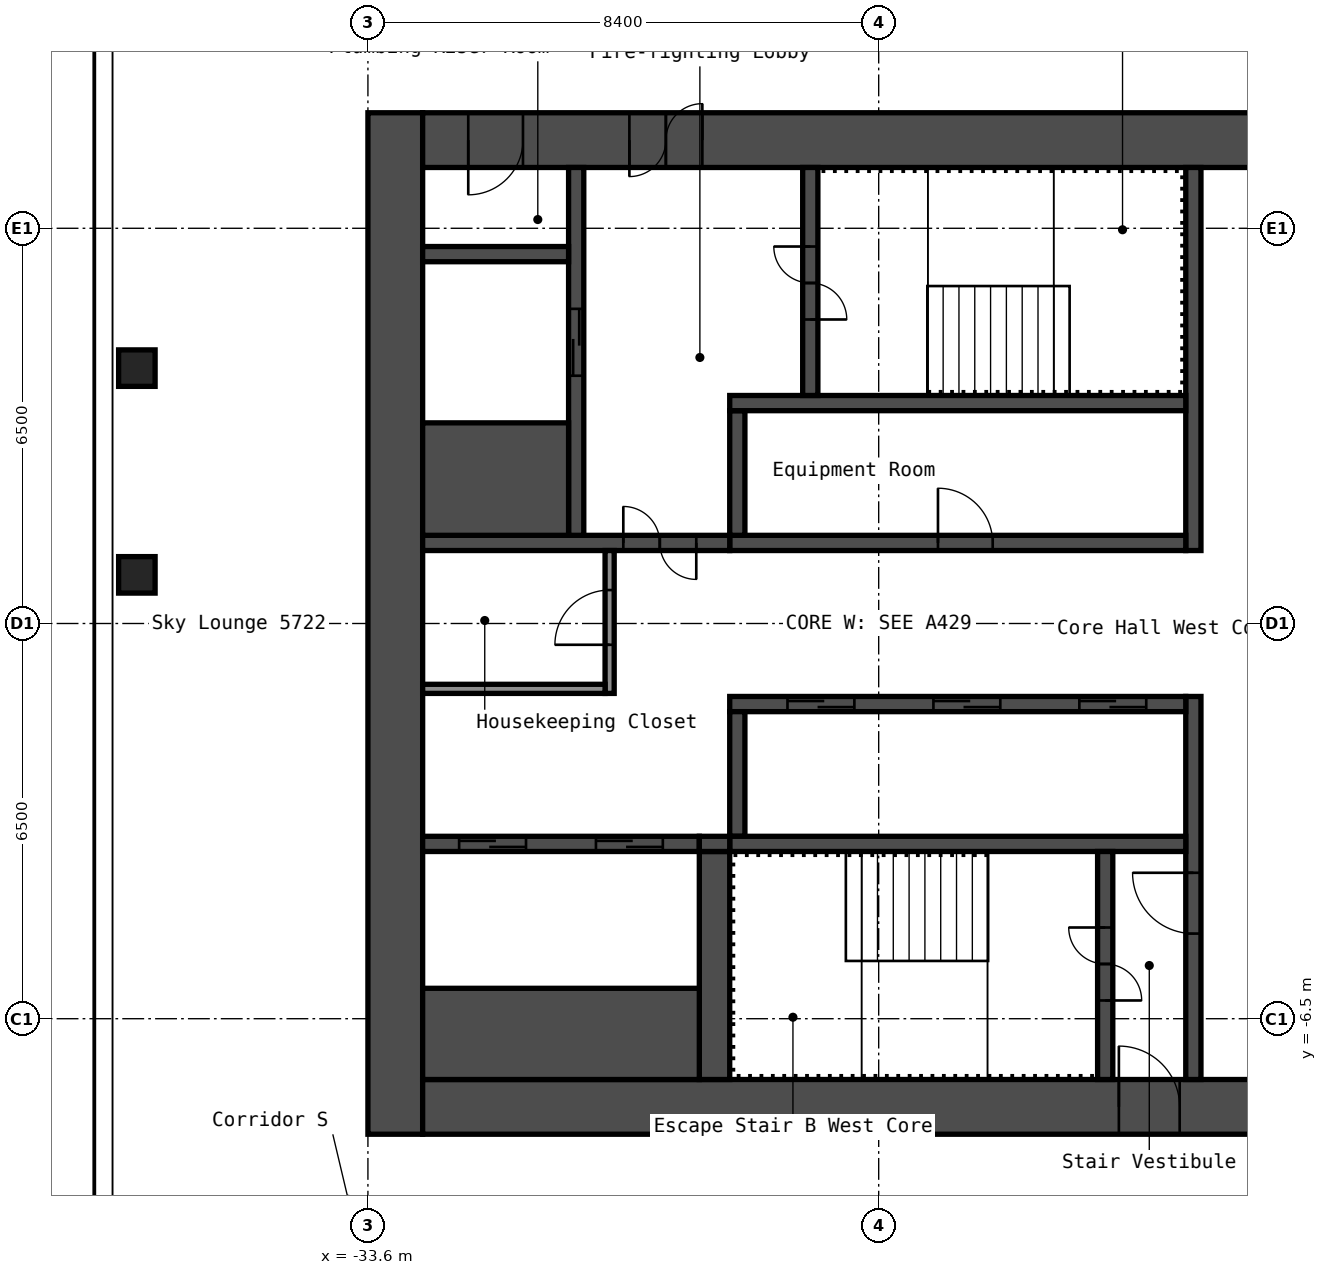
"""IFC4 building model, lengths in metres.
Left out: names, types, materials, properties, quantities, classifications, styles, units other than length and angle.
Written with IfcOpenShell. Run it as: python <this file> out.ifc"""

import sys

from ifc_helpers import new_model, si_unit, direction, frame, frame_2d, origin, origin_2d, place, context, subcontext, project, spatial, rectangle, hollow_rectangle, extrude, element, fill, save


model = new_model("IFC4")
c1 = context("Model", 3, precision=1e-05, world=origin(), true_north=direction((0.0, 1.0)))
c2 = subcontext(c1, "Body", "Model", "MODEL_VIEW")
j1 = project(units=[si_unit("LENGTHUNIT", "METRE"), si_unit("PLANEANGLEUNIT", "RADIAN")], contexts=[c1])
p1 = place(None, origin())
s1 = spatial("IfcSite", under=j1, at=p1, CompositionType="ELEMENT")
p2 = place(p1, origin())
s2 = spatial("IfcBuilding", under=s1, at=p2, CompositionType="ELEMENT")
p3 = place(p2, frame((0.0, 0.0, 202.6)))
s3 = spatial("IfcBuildingStorey", under=s2, at=p3, CompositionType="ELEMENT", Elevation=202.6)
for number, where, z_axis, x_axis in (
    (1, (-37.4, 0.8, 0.0), (0.0, 0.0, 1.0), (1.0, 0.0, 0.0)),
    (2, (-37.4, 4.2, 0.0), (0.0, 0.0, 1.0), (1.0, 0.0, 0.0)),
):
    element("IfcColumn", number, at=place(p3, frame(where, z_axis=z_axis, x_axis=x_axis)), inside=s3, PredefinedType="COLUMN", context=c2, shape_type="SweptSolid", body=[
        extrude(hollow_rectangle(XDim=0.6, YDim=0.6, WallThickness=0.025, InnerFilletRadius=0.038, OuterFilletRadius=0.062, at=origin_2d()), origin(), (0.0, 0.0, 1.0), 2.75),
    ])
p4 = place(p3, frame((-33.15, -8.4, 0.0), z_axis=(0.0, 0.0, 1.0), x_axis=(0.0, 1.0, 0.0)))
e3 = element("IfcWall", 3, at=p4, inside=s3, PredefinedType="SHEAR", context=c2, shape_type="SweptSolid", body=[
    extrude(rectangle(XDim=16.8, YDim=0.9, at=frame_2d((8.4, 0.0))), origin(), (0.0, 0.0, 1.0), 2.75),
])
p5 = place(p3, frame((-32.7, 7.95, 0.0), z_axis=(0.0, 0.0, 1.0), x_axis=(1.0, 0.0, 0.0)))
e4 = element("IfcWall", 4, at=p5, inside=s3, PredefinedType="SHEAR", context=c2, shape_type="SweptSolid", body=[
    extrude(rectangle(XDim=15.0, YDim=0.9, at=frame_2d((7.5, 0.0))), origin(), (0.0, 0.0, 1.0), 2.75),
])
p6 = place(p5, frame((3.4, 0.0, 0.0)))
e5 = element("IfcOpeningElement", 5, at=p6, cuts=e4, PredefinedType="OPENING", context=c2, shape_type="SweptSolid", body=[
    extrude(rectangle(XDim=1.2, YDim=2.1, at=frame_2d((0.6, 1.05))), frame((0.0, 0.46, 0.0), z_axis=(0.0, -1.0, 0.0), x_axis=(1.0, 0.0, 0.0)), (0.0, 0.0, 1.0), 0.92),
])
p7 = place(p5, frame((0.75, 0.0, 0.0)))
e6 = element("IfcOpeningElement", 6, at=p7, cuts=e4, PredefinedType="OPENING", context=c2, shape_type="SweptSolid", body=[
    extrude(rectangle(XDim=0.9, YDim=2.1, at=frame_2d((0.45, 1.05))), frame((0.0, 0.46, 0.0), z_axis=(0.0, -1.0, 0.0), x_axis=(1.0, 0.0, 0.0)), (0.0, 0.0, 1.0), 0.92),
])
p8 = place(p3, frame((-32.7, -7.95, 0.0), z_axis=(0.0, 0.0, 1.0), x_axis=(1.0, 0.0, 0.0)))
e7 = element("IfcWall", 7, at=p8, inside=s3, PredefinedType="SHEAR", context=c2, shape_type="SweptSolid", body=[
    extrude(rectangle(XDim=15.0, YDim=0.9, at=frame_2d((7.5, 0.0))), origin(), (0.0, 0.0, 1.0), 2.75),
])
p9 = place(p8, frame((11.45, 0.0, 0.0)))
e8 = element("IfcOpeningElement", 8, at=p9, cuts=e7, PredefinedType="OPENING", context=c2, shape_type="SweptSolid", body=[
    extrude(rectangle(XDim=1.0, YDim=2.1, at=frame_2d((0.5, 1.05))), frame((0.0, 0.46, 0.0), z_axis=(0.0, -1.0, 0.0), x_axis=(1.0, 0.0, 0.0)), (0.0, 0.0, 1.0), 0.92),
])
p10 = place(p3, frame((-20.025, 1.2, 0.0), z_axis=(0.0, 0.0, 1.0), x_axis=(0.0, 1.0, 0.0)))
e9 = element("IfcWall", 9, at=p10, inside=s3, PredefinedType="SHEAR", context=c2, shape_type="SweptSolid", body=[
    extrude(rectangle(XDim=6.3, YDim=0.25, at=frame_2d((3.15, 0.0))), origin(), (0.0, 0.0, 1.0), 2.75),
])
p11 = place(p3, frame((-20.025, -7.5, 0.0), z_axis=(0.0, 0.0, 1.0), x_axis=(0.0, 1.0, 0.0)))
e10 = element("IfcWall", 10, at=p11, inside=s3, PredefinedType="SHEAR", context=c2, shape_type="SweptSolid", body=[
    extrude(rectangle(XDim=6.3, YDim=0.25, at=frame_2d((3.15, 0.0))), origin(), (0.0, 0.0, 1.0), 2.75),
])
p12 = place(p11, frame((2.4, 0.0, 0.0)))
e11 = element("IfcOpeningElement", 11, at=p12, cuts=e10, PredefinedType="OPENING", context=c2, shape_type="SweptSolid", body=[
    extrude(rectangle(XDim=1.0, YDim=2.1, at=frame_2d((0.5, 1.05))), frame((0.0, 0.135, 0.0), z_axis=(0.0, -1.0, 0.0), x_axis=(1.0, 0.0, 0.0)), (0.0, 0.0, 1.0), 0.27),
])
p13 = place(p3, frame((-27.65, 1.325, 0.0), z_axis=(0.0, 0.0, 1.0), x_axis=(1.0, 0.0, 0.0)))
e12 = element("IfcWall", 12, at=p13, inside=s3, PredefinedType="SHEAR", context=c2, shape_type="SweptSolid", body=[
    extrude(rectangle(XDim=7.5, YDim=0.25, at=frame_2d((3.75, 0.0))), origin(), (0.0, 0.0, 1.0), 2.75),
])
p14 = place(p13, frame((3.425, 0.0, 0.0)))
e13 = element("IfcOpeningElement", 13, at=p14, cuts=e12, PredefinedType="OPENING", context=c2, shape_type="SweptSolid", body=[
    extrude(rectangle(XDim=0.9, YDim=2.1, at=frame_2d((0.45, 1.05))), frame((0.0, 0.135, 0.0), z_axis=(0.0, -1.0, 0.0), x_axis=(1.0, 0.0, 0.0)), (0.0, 0.0, 1.0), 0.27),
])
p15 = place(p3, frame((-27.525, 1.45, 0.0), z_axis=(0.0, 0.0, 1.0), x_axis=(0.0, 1.0, 0.0)))
e14 = element("IfcWall", 14, at=p15, inside=s3, PredefinedType="SHEAR", context=c2, shape_type="SweptSolid", body=[
    extrude(rectangle(XDim=2.05, YDim=0.25, at=frame_2d((1.025, 0.0))), origin(), (0.0, 0.0, 1.0), 2.75),
])
p16 = place(p3, frame((-27.65, 3.625, 0.0), z_axis=(0.0, 0.0, 1.0), x_axis=(1.0, 0.0, 0.0)))
e15 = element("IfcWall", 15, at=p16, inside=s3, PredefinedType="SHEAR", context=c2, shape_type="SweptSolid", body=[
    extrude(rectangle(XDim=7.5, YDim=0.25, at=frame_2d((3.75, 0.0))), origin(), (0.0, 0.0, 1.0), 2.75),
])
p17 = place(p3, frame((-26.325, 3.75, 0.0), z_axis=(0.0, 0.0, 1.0), x_axis=(0.0, 1.0, 0.0)))
e16 = element("IfcWall", 16, at=p17, inside=s3, PredefinedType="SHEAR", context=c2, shape_type="SweptSolid", body=[
    extrude(rectangle(XDim=3.75, YDim=0.25, at=frame_2d((1.875, 0.0))), origin(), (0.0, 0.0, 1.0), 2.75),
])
p18 = place(p17, frame((1.25, 0.0, 0.0)))
e17 = element("IfcOpeningElement", 17, at=p18, cuts=e16, PredefinedType="OPENING", context=c2, shape_type="SweptSolid", body=[
    extrude(rectangle(XDim=1.2, YDim=2.1, at=frame_2d((0.6, 1.05))), frame((0.0, 0.135, 0.0), z_axis=(0.0, -1.0, 0.0), x_axis=(1.0, 0.0, 0.0)), (0.0, 0.0, 1.0), 0.27),
])
p19 = place(p3, frame((-32.7, 1.325, 0.0), z_axis=(0.0, 0.0, 1.0), x_axis=(1.0, 0.0, 0.0)))
e18 = element("IfcWall", 18, at=p19, inside=s3, PredefinedType="SHEAR", context=c2, shape_type="SweptSolid", body=[
    extrude(rectangle(XDim=5.05, YDim=0.25, at=frame_2d((2.525, 0.0))), origin(), (0.0, 0.0, 1.0), 2.75),
])
p20 = place(p19, frame((3.3, 0.0, 0.0)))
e19 = element("IfcOpeningElement", 19, at=p20, cuts=e18, PredefinedType="OPENING", context=c2, shape_type="SweptSolid", body=[
    extrude(rectangle(XDim=1.2, YDim=2.1, at=frame_2d((0.6, 1.05))), frame((0.0, 0.135, 0.0), z_axis=(0.0, -1.0, 0.0), x_axis=(1.0, 0.0, 0.0)), (0.0, 0.0, 1.0), 0.27),
])
p21 = place(p3, frame((-30.175, 1.45, 0.0), z_axis=(0.0, 0.0, 1.0), x_axis=(0.0, 1.0, 0.0)))
e20 = element("IfcWall", 20, at=p21, inside=s3, PredefinedType="SHEAR", context=c2, shape_type="SweptSolid", body=[
    extrude(rectangle(XDim=6.05, YDim=0.25, at=frame_2d((3.025, 0.0))), origin(), (0.0, 0.0, 1.0), 2.75),
])
p22 = place(p21, frame((2.625, 0.0, 0.0)))
e21 = element("IfcOpeningElement", 21, at=p22, cuts=e20, PredefinedType="OPENING", context=c2, shape_type="SweptSolid", body=[
    extrude(rectangle(XDim=1.1, YDim=2.1, at=frame_2d((0.55, 1.05))), frame((0.0, 0.135, 0.0), z_axis=(0.0, -1.0, 0.0), x_axis=(1.0, 0.0, 0.0)), (0.0, 0.0, 1.0), 0.27),
])
p23 = place(p3, frame((-32.7, 2.375, 0.0), z_axis=(0.0, 0.0, 1.0), x_axis=(1.0, 0.0, 0.0)))
e22 = element("IfcWall", 22, at=p23, inside=s3, PredefinedType="SHEAR", context=c2, shape_type="SweptSolid", body=[
    extrude(rectangle(XDim=2.4, YDim=1.85, at=frame_2d((1.2, 0.0))), origin(), (0.0, 0.0, 1.0), 2.75),
])
p24 = place(p3, frame((-32.7, 6.075, 0.0), z_axis=(0.0, 0.0, 1.0), x_axis=(1.0, 0.0, 0.0)))
e23 = element("IfcWall", 23, at=p24, inside=s3, PredefinedType="SHEAR", context=c2, shape_type="SweptSolid", body=[
    extrude(rectangle(XDim=2.4, YDim=0.25, at=frame_2d((1.2, 0.0))), origin(), (0.0, 0.0, 1.0), 2.75),
])
p25 = place(p3, frame((-27.65, -1.325, 0.0), z_axis=(0.0, 0.0, 1.0), x_axis=(1.0, 0.0, 0.0)))
e24 = element("IfcWall", 24, at=p25, inside=s3, PredefinedType="SHEAR", context=c2, shape_type="SweptSolid", body=[
    extrude(rectangle(XDim=7.5, YDim=0.25, at=frame_2d((3.75, 0.0))), origin(), (0.0, 0.0, 1.0), 2.75),
])
p26 = place(p25, frame((5.75, 0.0, 0.0)))
e25 = element("IfcOpeningElement", 25, at=p26, cuts=e24, PredefinedType="OPENING", context=c2, shape_type="SweptSolid", body=[
    extrude(rectangle(XDim=1.1, YDim=2.1, at=frame_2d((0.55, 1.05))), frame((0.0, 0.135, 0.0), z_axis=(0.0, -1.0, 0.0), x_axis=(1.0, 0.0, 0.0)), (0.0, 0.0, 1.0), 0.27),
])
p27 = place(p25, frame((3.35, 0.0, 0.0)))
e26 = element("IfcOpeningElement", 26, at=p27, cuts=e24, PredefinedType="OPENING", context=c2, shape_type="SweptSolid", body=[
    extrude(rectangle(XDim=1.1, YDim=2.1, at=frame_2d((0.55, 1.05))), frame((0.0, 0.135, 0.0), z_axis=(0.0, -1.0, 0.0), x_axis=(1.0, 0.0, 0.0)), (0.0, 0.0, 1.0), 0.27),
])
p28 = place(p25, frame((0.95, 0.0, 0.0)))
e27 = element("IfcOpeningElement", 27, at=p28, cuts=e24, PredefinedType="OPENING", context=c2, shape_type="SweptSolid", body=[
    extrude(rectangle(XDim=1.1, YDim=2.1, at=frame_2d((0.55, 1.05))), frame((0.0, 0.135, 0.0), z_axis=(0.0, -1.0, 0.0), x_axis=(1.0, 0.0, 0.0)), (0.0, 0.0, 1.0), 0.27),
])
p29 = place(p3, frame((-27.525, -3.5, 0.0), z_axis=(0.0, 0.0, 1.0), x_axis=(0.0, 1.0, 0.0)))
e28 = element("IfcWall", 28, at=p29, inside=s3, PredefinedType="SHEAR", context=c2, shape_type="SweptSolid", body=[
    extrude(rectangle(XDim=2.05, YDim=0.25, at=frame_2d((1.025, 0.0))), origin(), (0.0, 0.0, 1.0), 2.75),
])
p30 = place(p3, frame((-27.65, -3.625, 0.0), z_axis=(0.0, 0.0, 1.0), x_axis=(1.0, 0.0, 0.0)))
e29 = element("IfcWall", 29, at=p30, inside=s3, PredefinedType="SHEAR", context=c2, shape_type="SweptSolid", body=[
    extrude(rectangle(XDim=7.5, YDim=0.25, at=frame_2d((3.75, 0.0))), origin(), (0.0, 0.0, 1.0), 2.75),
])
p31 = place(p3, frame((-21.475, -7.5, 0.0), z_axis=(0.0, 0.0, 1.0), x_axis=(0.0, 1.0, 0.0)))
e30 = element("IfcWall", 30, at=p31, inside=s3, PredefinedType="SHEAR", context=c2, shape_type="SweptSolid", body=[
    extrude(rectangle(XDim=3.75, YDim=0.25, at=frame_2d((1.875, 0.0))), origin(), (0.0, 0.0, 1.0), 2.75),
])
p32 = place(p31, frame((1.3, 0.0, 0.0)))
e31 = element("IfcOpeningElement", 31, at=p32, cuts=e30, PredefinedType="OPENING", context=c2, shape_type="SweptSolid", body=[
    extrude(rectangle(XDim=1.2, YDim=2.1, at=frame_2d((0.6, 1.05))), frame((0.0, 0.135, 0.0), z_axis=(0.0, -1.0, 0.0), x_axis=(1.0, 0.0, 0.0)), (0.0, 0.0, 1.0), 0.27),
])
p33 = place(p3, frame((-27.9, -7.5, 0.0), z_axis=(0.0, 0.0, 1.0), x_axis=(0.0, 1.0, 0.0)))
e32 = element("IfcWall", 32, at=p33, inside=s3, PredefinedType="SHEAR", context=c2, shape_type="SweptSolid", body=[
    extrude(rectangle(XDim=3.75, YDim=0.5, at=frame_2d((1.875, 0.0))), origin(), (0.0, 0.0, 1.0), 2.75),
])
p34 = place(p3, frame((-32.7, -3.625, 0.0), z_axis=(0.0, 0.0, 1.0), x_axis=(1.0, 0.0, 0.0)))
e33 = element("IfcWall", 33, at=p34, inside=s3, PredefinedType="SHEAR", context=c2, shape_type="SweptSolid", body=[
    extrude(rectangle(XDim=4.55, YDim=0.25, at=frame_2d((2.275, 0.0))), origin(), (0.0, 0.0, 1.0), 2.75),
])
p35 = place(p34, frame((2.85, 0.0, 0.0)))
e34 = element("IfcOpeningElement", 34, at=p35, cuts=e33, PredefinedType="OPENING", context=c2, shape_type="SweptSolid", body=[
    extrude(rectangle(XDim=1.1, YDim=2.1, at=frame_2d((0.55, 1.05))), frame((0.0, 0.135, 0.0), z_axis=(0.0, -1.0, 0.0), x_axis=(1.0, 0.0, 0.0)), (0.0, 0.0, 1.0), 0.27),
])
p36 = place(p34, frame((0.6, 0.0, 0.0)))
e35 = element("IfcOpeningElement", 35, at=p36, cuts=e33, PredefinedType="OPENING", context=c2, shape_type="SweptSolid", body=[
    extrude(rectangle(XDim=1.1, YDim=2.1, at=frame_2d((0.55, 1.05))), frame((0.0, 0.135, 0.0), z_axis=(0.0, -1.0, 0.0), x_axis=(1.0, 0.0, 0.0)), (0.0, 0.0, 1.0), 0.27),
])
p37 = place(p3, frame((-32.7, -6.75, 0.0), z_axis=(0.0, 0.0, 1.0), x_axis=(1.0, 0.0, 0.0)))
e36 = element("IfcWall", 36, at=p37, inside=s3, PredefinedType="SHEAR", context=c2, shape_type="SweptSolid", body=[
    extrude(rectangle(XDim=4.55, YDim=1.5, at=frame_2d((2.275, 0.0))), origin(), (0.0, 0.0, 1.0), 2.75),
])
p38 = place(p3, frame((-28.15, -3.625, 0.0), z_axis=(0.0, 0.0, 1.0), x_axis=(1.0, 0.0, 0.0)))
e37 = element("IfcWall", 37, at=p38, inside=s3, PredefinedType="SHEAR", context=c2, shape_type="SweptSolid", body=[
    extrude(rectangle(XDim=0.5, YDim=0.25, at=frame_2d((0.25, 0.0))), origin(), (0.0, 0.0, 1.0), 2.75),
])
p39 = place(p3, frame((-29.625, -1.15, 0.0), z_axis=(0.0, 0.0, 1.0), x_axis=(0.0, 1.0, 0.0)))
e38 = element("IfcWall", 38, at=p39, inside=s3, PredefinedType="PARTITIONING", context=c2, shape_type="SweptSolid", body=[
    extrude(rectangle(XDim=2.35, YDim=0.15, at=frame_2d((1.175, 0.0))), origin(), (0.0, 0.0, 1.0), 2.75),
])
p40 = place(p39, frame((0.8, 0.0, 0.0)))
e39 = element("IfcOpeningElement", 39, at=p40, cuts=e38, PredefinedType="OPENING", context=c2, shape_type="SweptSolid", body=[
    extrude(rectangle(XDim=0.9, YDim=2.1, at=frame_2d((0.45, 1.05))), frame((0.0, 0.085, 0.0), z_axis=(0.0, -1.0, 0.0), x_axis=(1.0, 0.0, 0.0)), (0.0, 0.0, 1.0), 0.17),
])
p41 = place(p3, frame((-32.7, -1.075, 0.0), z_axis=(0.0, 0.0, 1.0), x_axis=(1.0, 0.0, 0.0)))
e40 = element("IfcWall", 40, at=p41, inside=s3, PredefinedType="PARTITIONING", context=c2, shape_type="SweptSolid", body=[
    extrude(rectangle(XDim=3.0, YDim=0.15, at=frame_2d((1.5, 0.0))), origin(), (0.0, 0.0, 1.0), 2.75),
])
p42 = place(p6, origin())
e41 = element("IfcDoor", 41, at=p42, inside=s3, OperationType="DOUBLE_DOOR_SINGLE_SWING", PredefinedType="DOOR", context=c2, shape_type="SweptSolid", body=[
    extrude(rectangle(XDim=1.2, YDim=2.1, at=frame_2d((0.6, 1.05))), frame((0.0, 0.025, 0.0), z_axis=(0.0, -1.0, 0.0), x_axis=(1.0, 0.0, 0.0)), (0.0, 0.0, 1.0), 0.05),
])
fill(e5, e41)
p43 = place(p7, origin())
e42 = element("IfcDoor", 42, at=p43, inside=s3, OperationType="SINGLE_SWING_LEFT", PredefinedType="DOOR", context=c2, shape_type="SweptSolid", body=[
    extrude(rectangle(XDim=0.9, YDim=2.1, at=frame_2d((0.45, 1.05))), frame((0.0, 0.025, 0.0), z_axis=(0.0, -1.0, 0.0), x_axis=(1.0, 0.0, 0.0)), (0.0, 0.0, 1.0), 0.05),
])
fill(e6, e42)
p44 = place(p9, origin())
e43 = element("IfcDoor", 43, at=p44, inside=s3, OperationType="SINGLE_SWING_RIGHT", PredefinedType="DOOR", context=c2, shape_type="SweptSolid", body=[
    extrude(rectangle(XDim=1.0, YDim=2.1, at=frame_2d((0.5, 1.05))), frame((0.0, 0.025, 0.0), z_axis=(0.0, -1.0, 0.0), x_axis=(1.0, 0.0, 0.0)), (0.0, 0.0, 1.0), 0.05),
])
fill(e8, e43)
p45 = place(p18, origin())
e44 = element("IfcDoor", 44, at=p45, inside=s3, OperationType="DOUBLE_DOOR_SINGLE_SWING", PredefinedType="DOOR", context=c2, shape_type="SweptSolid", body=[
    extrude(rectangle(XDim=1.2, YDim=2.1, at=frame_2d((0.6, 1.05))), frame((0.0, 0.025, 0.0), z_axis=(0.0, -1.0, 0.0), x_axis=(1.0, 0.0, 0.0)), (0.0, 0.0, 1.0), 0.05),
])
fill(e17, e44)
p46 = place(p32, origin())
e45 = element("IfcDoor", 45, at=p46, inside=s3, OperationType="DOUBLE_DOOR_SINGLE_SWING", PredefinedType="DOOR", context=c2, shape_type="SweptSolid", body=[
    extrude(rectangle(XDim=1.2, YDim=2.1, at=frame_2d((0.6, 1.05))), frame((0.0, 0.025, 0.0), z_axis=(0.0, -1.0, 0.0), x_axis=(1.0, 0.0, 0.0)), (0.0, 0.0, 1.0), 0.05),
])
fill(e31, e45)
p47 = place(p12, origin())
e46 = element("IfcDoor", 46, at=p47, inside=s3, OperationType="SINGLE_SWING_LEFT", PredefinedType="DOOR", context=c2, shape_type="SweptSolid", body=[
    extrude(rectangle(XDim=1.0, YDim=2.1, at=frame_2d((0.5, 1.05))), frame((0.0, 0.025, 0.0), z_axis=(0.0, -1.0, 0.0), x_axis=(1.0, 0.0, 0.0)), (0.0, 0.0, 1.0), 0.05),
])
fill(e11, e46)
p48 = place(p20, origin())
e47 = element("IfcDoor", 47, at=p48, inside=s3, OperationType="DOUBLE_DOOR_SINGLE_SWING", PredefinedType="DOOR", context=c2, shape_type="SweptSolid", body=[
    extrude(rectangle(XDim=1.2, YDim=2.1, at=frame_2d((0.6, 1.05))), frame((0.0, 0.025, 0.0), z_axis=(0.0, -1.0, 0.0), x_axis=(1.0, 0.0, 0.0)), (0.0, 0.0, 1.0), 0.05),
])
fill(e19, e47)
p49 = place(p40, origin())
e48 = element("IfcDoor", 48, at=p49, inside=s3, OperationType="SINGLE_SWING_RIGHT", PredefinedType="DOOR", context=c2, shape_type="SweptSolid", body=[
    extrude(rectangle(XDim=0.9, YDim=2.1, at=frame_2d((0.45, 1.05))), frame((0.0, 0.025, 0.0), z_axis=(0.0, -1.0, 0.0), x_axis=(1.0, 0.0, 0.0)), (0.0, 0.0, 1.0), 0.05),
])
fill(e39, e48)
p50 = place(p14, origin())
e49 = element("IfcDoor", 49, at=p50, inside=s3, OperationType="SINGLE_SWING_RIGHT", PredefinedType="DOOR", context=c2, shape_type="SweptSolid", body=[
    extrude(rectangle(XDim=0.9, YDim=2.1, at=frame_2d((0.45, 1.05))), frame((0.0, 0.025, 0.0), z_axis=(0.0, -1.0, 0.0), x_axis=(1.0, 0.0, 0.0)), (0.0, 0.0, 1.0), 0.05),
])
fill(e13, e49)
p51 = place(p26, origin())
e50 = element("IfcDoor", 50, at=p51, inside=s3, OperationType="DOUBLE_DOOR_SLIDING", PredefinedType="DOOR", context=c2, shape_type="SweptSolid", body=[
    extrude(rectangle(XDim=1.1, YDim=2.1, at=frame_2d((0.55, 1.05))), frame((0.0, 0.025, 0.0), z_axis=(0.0, -1.0, 0.0), x_axis=(1.0, 0.0, 0.0)), (0.0, 0.0, 1.0), 0.05),
])
fill(e25, e50)
p52 = place(p27, origin())
e51 = element("IfcDoor", 51, at=p52, inside=s3, OperationType="DOUBLE_DOOR_SLIDING", PredefinedType="DOOR", context=c2, shape_type="SweptSolid", body=[
    extrude(rectangle(XDim=1.1, YDim=2.1, at=frame_2d((0.55, 1.05))), frame((0.0, 0.025, 0.0), z_axis=(0.0, -1.0, 0.0), x_axis=(1.0, 0.0, 0.0)), (0.0, 0.0, 1.0), 0.05),
])
fill(e26, e51)
p53 = place(p28, origin())
e52 = element("IfcDoor", 52, at=p53, inside=s3, OperationType="DOUBLE_DOOR_SLIDING", PredefinedType="DOOR", context=c2, shape_type="SweptSolid", body=[
    extrude(rectangle(XDim=1.1, YDim=2.1, at=frame_2d((0.55, 1.05))), frame((0.0, 0.025, 0.0), z_axis=(0.0, -1.0, 0.0), x_axis=(1.0, 0.0, 0.0)), (0.0, 0.0, 1.0), 0.05),
])
fill(e27, e52)
p54 = place(p22, origin())
e53 = element("IfcDoor", 53, at=p54, inside=s3, OperationType="DOUBLE_DOOR_SLIDING", PredefinedType="DOOR", context=c2, shape_type="SweptSolid", body=[
    extrude(rectangle(XDim=1.1, YDim=2.1, at=frame_2d((0.55, 1.05))), frame((0.0, 0.025, 0.0), z_axis=(0.0, -1.0, 0.0), x_axis=(1.0, 0.0, 0.0)), (0.0, 0.0, 1.0), 0.05),
])
fill(e21, e53)
p55 = place(p35, origin())
e54 = element("IfcDoor", 54, at=p55, inside=s3, OperationType="DOUBLE_DOOR_SLIDING", PredefinedType="DOOR", context=c2, shape_type="SweptSolid", body=[
    extrude(rectangle(XDim=1.1, YDim=2.1, at=frame_2d((0.55, 1.05))), frame((0.0, 0.025, 0.0), z_axis=(0.0, -1.0, 0.0), x_axis=(1.0, 0.0, 0.0)), (0.0, 0.0, 1.0), 0.05),
])
fill(e34, e54)
p56 = place(p36, origin())
e55 = element("IfcDoor", 55, at=p56, inside=s3, OperationType="DOUBLE_DOOR_SLIDING", PredefinedType="DOOR", context=c2, shape_type="SweptSolid", body=[
    extrude(rectangle(XDim=1.1, YDim=2.1, at=frame_2d((0.55, 1.05))), frame((0.0, 0.025, 0.0), z_axis=(0.0, -1.0, 0.0), x_axis=(1.0, 0.0, 0.0)), (0.0, 0.0, 1.0), 0.05),
])
fill(e35, e55)
save(model, sys.argv[1])
